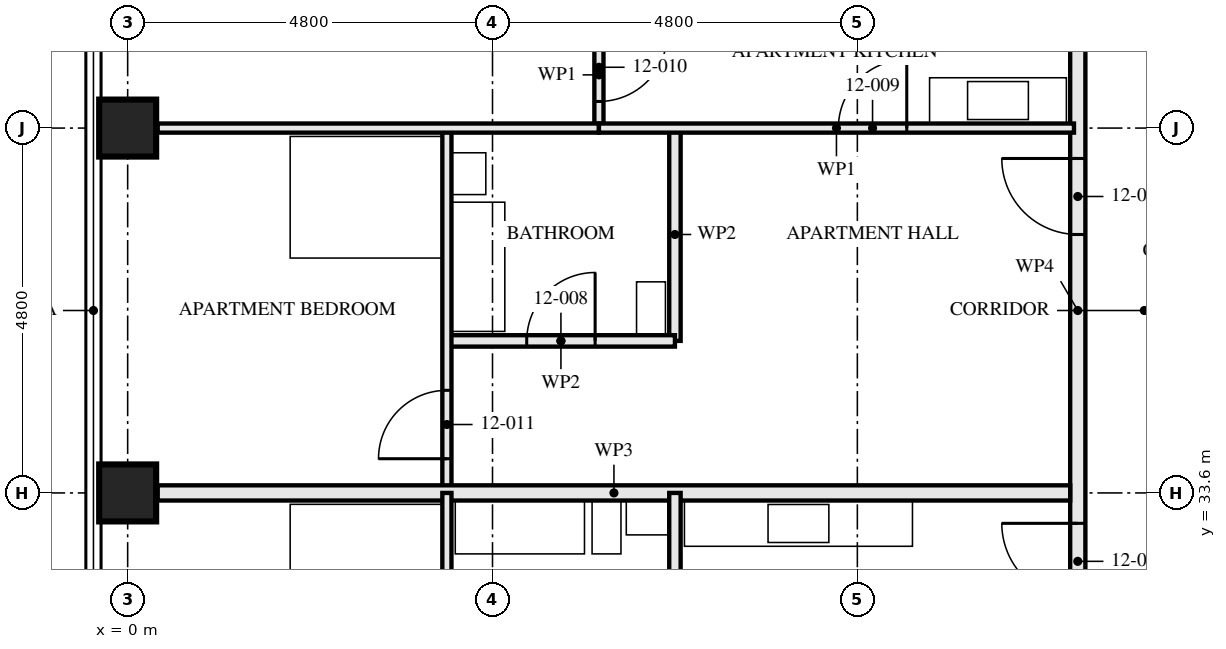
"""IFC4 building model, lengths in metres.
Left out: names, types, materials, properties, quantities, classifications, styles, units other than length and angle.
Written with IfcOpenShell. Run it as: python <this file> out.ifc"""

import sys

from ifc_helpers import new_model, si_unit, direction, frame, frame_2d, origin, origin_2d, place, context, subcontext, project, spatial, rectangle, hollow_rectangle, extrude, element, fill, save


model = new_model("IFC4")
c1 = context("Model", 3, precision=1e-05, world=origin(), true_north=direction((0.0, 1.0)))
c2 = subcontext(c1, "Body", "Model", "MODEL_VIEW")
j1 = project(units=[si_unit("LENGTHUNIT", "METRE"), si_unit("PLANEANGLEUNIT", "RADIAN")], contexts=[c1])
p1 = place(None, origin())
s1 = spatial("IfcSite", under=j1, at=p1, CompositionType="ELEMENT")
p2 = place(p1, origin())
s2 = spatial("IfcBuilding", under=s1, at=p2, CompositionType="ELEMENT")
p3 = place(p2, frame((0.0, 0.0, 48.0)))
s3 = spatial("IfcBuildingStorey", under=s2, at=p3, CompositionType="ELEMENT", Elevation=48.0)
for number, where, z_axis, x_axis in (
    (1, (0.0, 33.6, 0.0), (0.0, 0.0, 1.0), (1.0, 0.0, 0.0)),
    (2, (0.0, 38.4, 0.0), (0.0, 0.0, 1.0), (1.0, 0.0, 0.0)),
):
    element("IfcColumn", number, at=place(p3, frame(where, z_axis=z_axis, x_axis=x_axis)), inside=s3, PredefinedType="COLUMN", context=c2, shape_type="SweptSolid", body=[
        extrude(hollow_rectangle(XDim=0.75, YDim=0.75, WallThickness=0.08, at=origin_2d()), origin(), (0.0, 0.0, 1.0), 3.5),
    ])
p4 = place(p3, frame((4.2, 35.6, 0.0), z_axis=(0.0, 0.0, 1.0), x_axis=(1.0, 0.0, 0.0)))
e3 = element("IfcWall", 3, at=p4, inside=s3, PredefinedType="PARTITIONING", context=c2, shape_type="SweptSolid", body=[
    extrude(rectangle(XDim=3.0, YDim=0.15, at=frame_2d((1.5, 0.0))), origin(), (0.0, 0.0, 1.0), 3.33),
])
p5 = place(p4, frame((1.05, 0.0, 0.0)))
e4 = element("IfcOpeningElement", 4, at=p5, cuts=e3, PredefinedType="OPENING", context=c2, shape_type="SweptSolid", body=[
    extrude(rectangle(XDim=0.9, YDim=2.1, at=frame_2d((0.45, 1.05))), frame((0.0, 0.085, 0.0), z_axis=(0.0, -1.0, 0.0), x_axis=(1.0, 0.0, 0.0)), (0.0, 0.0, 1.0), 0.171),
])
p6 = place(p3, frame((7.2, 38.4, 0.0), z_axis=(0.0, 0.0, 1.0), x_axis=(0.0, -1.0, 0.0)))
e5 = element("IfcWall", 5, at=p6, inside=s3, PredefinedType="PARTITIONING", context=c2, shape_type="SweptSolid", body=[
    extrude(rectangle(XDim=2.8, YDim=0.15, at=frame_2d((1.4, 0.0))), origin(), (0.0, 0.0, 1.0), 3.33),
])
p7 = place(p3, frame((6.2, 38.4, 0.0), z_axis=(0.0, 0.0, 1.0), x_axis=(1.0, 0.0, 0.0)))
e6 = element("IfcWall", 6, at=p7, inside=s3, PredefinedType="PARTITIONING", context=c2, shape_type="SweptSolid", body=[
    extrude(rectangle(XDim=6.25, YDim=0.12, at=frame_2d((3.125, 0.0))), origin(), (0.0, 0.0, 1.0), 2.55),
])
p8 = place(p7, frame((3.15, 0.0, 0.0)))
e7 = element("IfcOpeningElement", 7, at=p8, cuts=e6, PredefinedType="OPENING", context=c2, shape_type="SweptSolid", body=[
    extrude(rectangle(XDim=0.9, YDim=2.1, at=frame_2d((0.45, 1.05))), frame((0.0, 0.071, 0.0), z_axis=(0.0, -1.0, 0.0), x_axis=(1.0, 0.0, 0.0)), (0.0, 0.0, 1.0), 0.141),
])
p9 = place(p3, frame((6.2, 39.8, 0.0), z_axis=(0.0, 0.0, 1.0), x_axis=(0.0, -1.0, 0.0)))
e8 = element("IfcWall", 8, at=p9, inside=s3, PredefinedType="PARTITIONING", context=c2, shape_type="SweptSolid", body=[
    extrude(rectangle(XDim=1.4, YDim=0.12, at=frame_2d((0.7, 0.0))), origin(), (0.0, 0.0, 1.0), 3.33),
])
p10 = place(p9, frame((0.15, 0.0, 0.0)))
e9 = element("IfcOpeningElement", 9, at=p10, cuts=e8, PredefinedType="OPENING", context=c2, shape_type="SweptSolid", body=[
    extrude(rectangle(XDim=0.9, YDim=2.1, at=frame_2d((0.45, 1.05))), frame((0.0, 0.071, 0.0), z_axis=(0.0, -1.0, 0.0), x_axis=(1.0, 0.0, 0.0)), (0.0, 0.0, 1.0), 0.141),
])
p11 = place(p3, frame((4.2, 38.4, 0.0), z_axis=(0.0, 0.0, 1.0), x_axis=(0.0, -1.0, 0.0)))
e10 = element("IfcWall", 10, at=p11, inside=s3, PredefinedType="PARTITIONING", context=c2, shape_type="SweptSolid", body=[
    extrude(rectangle(XDim=4.8, YDim=0.12, at=frame_2d((2.4, 0.0))), origin(), (0.0, 0.0, 1.0), 3.33),
])
p12 = place(p11, frame((3.45, 0.0, 0.0)))
e11 = element("IfcOpeningElement", 11, at=p12, cuts=e10, PredefinedType="OPENING", context=c2, shape_type="SweptSolid", body=[
    extrude(rectangle(XDim=0.9, YDim=2.1, at=frame_2d((0.45, 1.05))), frame((0.0, 0.071, 0.0), z_axis=(0.0, -1.0, 0.0), x_axis=(1.0, 0.0, 0.0)), (0.0, 0.0, 1.0), 0.141),
])
p13 = place(p3, frame((0.395, 38.4, 0.0), z_axis=(0.0, 0.0, 1.0), x_axis=(1.0, 0.0, 0.0)))
e12 = element("IfcWall", 12, at=p13, inside=s3, PredefinedType="PARTITIONING", context=c2, shape_type="SweptSolid", body=[
    extrude(rectangle(XDim=5.805, YDim=0.12, at=frame_2d((2.902, 0.0))), origin(), (0.0, 0.0, 1.0), 2.55),
])
p14 = place(p3, frame((0.395, 33.6, 0.0), z_axis=(0.0, 0.0, 1.0), x_axis=(1.0, 0.0, 0.0)))
e13 = element("IfcWall", 13, at=p14, inside=s3, PredefinedType="PARTITIONING", context=c2, shape_type="SweptSolid", body=[
    extrude(rectangle(XDim=12.005, YDim=0.2, at=frame_2d((6.002, 0.0))), origin(), (0.0, 0.0, 1.0), 2.55),
])
p15 = place(p3, frame((7.2, 33.6, 0.0), z_axis=(0.0, 0.0, 1.0), x_axis=(0.0, -1.0, 0.0)))
e14 = element("IfcWall", 14, at=p15, inside=s3, PredefinedType="PARTITIONING", context=c2, shape_type="SweptSolid", body=[
    extrude(rectangle(XDim=2.8, YDim=0.15, at=frame_2d((1.4, 0.0))), origin(), (0.0, 0.0, 1.0), 3.33),
])
p16 = place(p3, frame((4.2, 33.6, 0.0), z_axis=(0.0, 0.0, 1.0), x_axis=(0.0, -1.0, 0.0)))
e15 = element("IfcWall", 15, at=p16, inside=s3, PredefinedType="PARTITIONING", context=c2, shape_type="SweptSolid", body=[
    extrude(rectangle(XDim=4.8, YDim=0.12, at=frame_2d((2.4, 0.0))), origin(), (0.0, 0.0, 1.0), 3.33),
])
p17 = place(p16, frame((2.975, 0.0, 0.0)))
e16 = element("IfcOpeningElement", 16, at=p17, cuts=e15, PredefinedType="OPENING", context=c2, shape_type="SweptSolid", body=[
    extrude(rectangle(XDim=0.9, YDim=2.1, at=frame_2d((0.45, 1.05))), frame((0.0, 0.071, 0.0), z_axis=(0.0, -1.0, 0.0), x_axis=(1.0, 0.0, 0.0)), (0.0, 0.0, 1.0), 0.141),
])
p18 = place(p3, frame((12.5, 43.2, 0.0), z_axis=(0.0, 0.0, 1.0), x_axis=(0.0, -1.0, 0.0)))
e17 = element("IfcWall", 17, at=p18, inside=s3, PredefinedType="PARTITIONING", context=c2, shape_type="SweptSolid", body=[
    extrude(rectangle(XDim=14.4, YDim=0.2, at=frame_2d((7.2, 0.0))), origin(), (0.0, 0.0, 1.0), 2.55),
])
p19 = place(p18, frame((1.4, 0.0, 0.0)))
e18 = element("IfcOpeningElement", 18, at=p19, cuts=e17, PredefinedType="OPENING", context=c2, shape_type="SweptSolid", body=[
    extrude(rectangle(XDim=1.0, YDim=2.1, at=frame_2d((0.5, 1.05))), frame((0.0, 0.111, 0.0), z_axis=(0.0, -1.0, 0.0), x_axis=(1.0, 0.0, 0.0)), (0.0, 0.0, 1.0), 0.221),
])
p20 = place(p18, frame((5.2, 0.0, 0.0)))
e19 = element("IfcOpeningElement", 19, at=p20, cuts=e17, PredefinedType="OPENING", context=c2, shape_type="SweptSolid", body=[
    extrude(rectangle(XDim=1.0, YDim=2.1, at=frame_2d((0.5, 1.05))), frame((0.0, 0.111, 0.0), z_axis=(0.0, -1.0, 0.0), x_axis=(1.0, 0.0, 0.0)), (0.0, 0.0, 1.0), 0.221),
])
p21 = place(p18, frame((10.0, 0.0, 0.0)))
e20 = element("IfcOpeningElement", 20, at=p21, cuts=e17, PredefinedType="OPENING", context=c2, shape_type="SweptSolid", body=[
    extrude(rectangle(XDim=1.0, YDim=2.1, at=frame_2d((0.5, 1.05))), frame((0.0, 0.111, 0.0), z_axis=(0.0, -1.0, 0.0), x_axis=(1.0, 0.0, 0.0)), (0.0, 0.0, 1.0), 0.221),
])
p22 = place(p5, origin())
e21 = element("IfcDoor", 21, at=p22, inside=s3, OperationType="SINGLE_SWING_LEFT", PredefinedType="DOOR", context=c2, shape_type="SweptSolid", body=[
    extrude(rectangle(XDim=0.9, YDim=2.1, at=frame_2d((0.45, 1.05))), frame((0.0, 0.022, 0.0), z_axis=(0.0, -1.0, 0.0), x_axis=(1.0, 0.0, 0.0)), (0.0, 0.0, 1.0), 0.044),
])
fill(e4, e21)
p23 = place(p8, origin())
e22 = element("IfcDoor", 22, at=p23, inside=s3, OperationType="SINGLE_SWING_LEFT", PredefinedType="DOOR", context=c2, shape_type="SweptSolid", body=[
    extrude(rectangle(XDim=0.9, YDim=2.1, at=frame_2d((0.45, 1.05))), frame((0.0, 0.022, 0.0), z_axis=(0.0, -1.0, 0.0), x_axis=(1.0, 0.0, 0.0)), (0.0, 0.0, 1.0), 0.044),
])
fill(e7, e22)
p24 = place(p10, origin())
e23 = element("IfcDoor", 23, at=p24, inside=s3, OperationType="SINGLE_SWING_RIGHT", PredefinedType="DOOR", context=c2, shape_type="SweptSolid", body=[
    extrude(rectangle(XDim=0.9, YDim=2.1, at=frame_2d((0.45, 1.05))), frame((0.0, 0.022, 0.0), z_axis=(0.0, -1.0, 0.0), x_axis=(1.0, 0.0, 0.0)), (0.0, 0.0, 1.0), 0.044),
])
fill(e9, e23)
p25 = place(p12, frame((0.9, 0.0, 0.0), z_axis=(0.0, 0.0, 1.0), x_axis=(-1.0, 0.0, 0.0)))
e24 = element("IfcDoor", 24, at=p25, inside=s3, OperationType="SINGLE_SWING_RIGHT", PredefinedType="DOOR", context=c2, shape_type="SweptSolid", body=[
    extrude(rectangle(XDim=0.9, YDim=2.1, at=frame_2d((0.45, 1.05))), frame((0.0, 0.022, 0.0), z_axis=(0.0, -1.0, 0.0), x_axis=(1.0, 0.0, 0.0)), (0.0, 0.0, 1.0), 0.044),
])
fill(e11, e24)
p26 = place(p20, frame((1.0, 0.0, 0.0), z_axis=(0.0, 0.0, 1.0), x_axis=(-1.0, 0.0, 0.0)))
e25 = element("IfcDoor", 25, at=p26, inside=s3, OperationType="SINGLE_SWING_LEFT", PredefinedType="DOOR", context=c2, shape_type="SweptSolid", body=[
    extrude(rectangle(XDim=1.0, YDim=2.1, at=frame_2d((0.5, 1.05))), frame((0.0, 0.027, 0.0), z_axis=(0.0, -1.0, 0.0), x_axis=(1.0, 0.0, 0.0)), (0.0, 0.0, 1.0), 0.054),
])
fill(e19, e25)
p27 = place(p21, frame((1.0, 0.0, 0.0), z_axis=(0.0, 0.0, 1.0), x_axis=(-1.0, 0.0, 0.0)))
e26 = element("IfcDoor", 26, at=p27, inside=s3, OperationType="SINGLE_SWING_LEFT", PredefinedType="DOOR", context=c2, shape_type="SweptSolid", body=[
    extrude(rectangle(XDim=1.0, YDim=2.1, at=frame_2d((0.5, 1.05))), frame((0.0, 0.027, 0.0), z_axis=(0.0, -1.0, 0.0), x_axis=(1.0, 0.0, 0.0)), (0.0, 0.0, 1.0), 0.054),
])
fill(e20, e26)
save(model, sys.argv[1])
